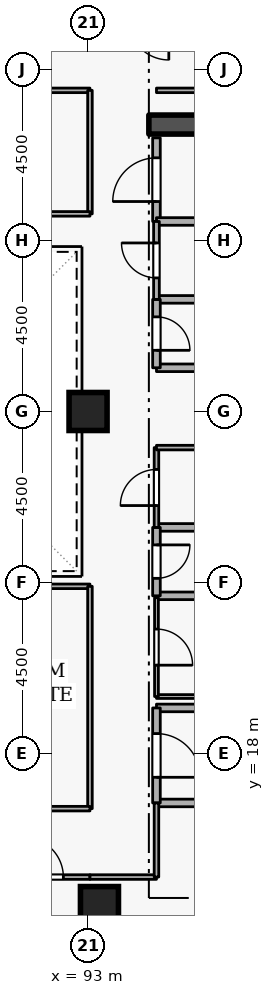
"""IFC4 building model, lengths in metres.
Left out: names, types, materials, properties, quantities, classifications, styles, units other than length and angle.
Written with IfcOpenShell. Run it as: python <this file> out.ifc"""

import sys

from ifc_helpers import new_model, si_unit, direction, frame, frame_2d, origin, origin_2d, place, context, subcontext, project, spatial, rectangle, extrude, element, fill, save


model = new_model("IFC4")
c1 = context("Model", 3, precision=1e-05, world=origin(), true_north=direction((0.0, 1.0)))
c2 = subcontext(c1, "Body", "Model", "MODEL_VIEW")
j1 = project(units=[si_unit("LENGTHUNIT", "METRE"), si_unit("PLANEANGLEUNIT", "RADIAN")], contexts=[c1])
p1 = place(None, origin())
s1 = spatial("IfcSite", under=j1, at=p1, CompositionType="ELEMENT")
p2 = place(p1, origin())
s2 = spatial("IfcBuilding", under=s1, at=p2, CompositionType="ELEMENT")
p3 = place(p2, frame((0.0, 0.0, 203.7)))
s3 = spatial("IfcBuildingStorey", under=s2, at=p3, CompositionType="ELEMENT", Elevation=203.7)
p4 = place(p3, frame((94.6, 34.55, 0.0), z_axis=(0.0, 0.0, 1.0), x_axis=(1.0, 0.0, 0.0)))
e1 = element("IfcWall", 1, at=p4, inside=s3, PredefinedType="SHEAR", context=c2, shape_type="SweptSolid", body=[
    extrude(rectangle(XDim=5.8, YDim=0.5, at=frame_2d((2.9, 0.0))), origin(), (0.0, 0.0, 1.0), 3.6),
])
for number, where, z_axis, x_axis in (
    (2, (93.3, 14.0, 0.0), (0.0, 0.0, 1.0), (1.0, 0.0, 0.0)),
    (3, (93.0, 27.0, 0.0), (0.0, 0.0, 1.0), (1.0, 0.0, 0.0)),
):
    element("IfcColumn", number, at=place(p3, frame(where, z_axis=z_axis, x_axis=x_axis)), inside=s3, PredefinedType="COLUMN", context=c2, shape_type="SweptSolid", body=[
        extrude(rectangle(XDim=1.0, YDim=1.0, at=origin_2d()), origin(), (0.0, 0.0, 1.0), 3.6),
    ])
p5 = place(p3, frame((94.8, 16.7, 0.0), z_axis=(0.0, 0.0, 1.0), x_axis=(1.0, 0.0, 0.0)))
e4 = element("IfcWall", 4, at=p5, inside=s3, PredefinedType="STANDARD", context=c2, shape_type="SweptSolid", body=[
    extrude(rectangle(XDim=5.7, YDim=0.2, at=frame_2d((2.85, 0.0))), origin(), (0.0, 0.0, 1.0), 3.34),
])
p6 = place(p3, frame((97.1, 19.2, 0.0), z_axis=(0.0, 0.0, 1.0), x_axis=(-1.0, 0.0, 0.0)))
e5 = element("IfcWall", 5, at=p6, inside=s3, PredefinedType="STANDARD", context=c2, shape_type="SweptSolid", body=[
    extrude(rectangle(XDim=2.3, YDim=0.2, at=frame_2d((1.15, 0.0))), origin(), (0.0, 0.0, 1.0), 2.545),
])
p7 = place(p3, frame((94.8, 19.2, 0.0), z_axis=(0.0, 0.0, 1.0), x_axis=(0.0, -1.0, 0.0)))
e6 = element("IfcWall", 6, at=p7, inside=s3, PredefinedType="STANDARD", context=c2, shape_type="SweptSolid", body=[
    extrude(rectangle(XDim=2.5, YDim=0.2, at=frame_2d((1.25, 0.0))), origin(), (0.0, 0.0, 1.0), 3.34),
])
p8 = place(p7, frame((0.675, 0.0, 0.0)))
e7 = element("IfcOpeningElement", 7, at=p8, cuts=e6, PredefinedType="OPENING", context=c2, shape_type="SweptSolid", body=[
    extrude(rectangle(XDim=1.15, YDim=2.1, at=frame_2d((0.575, 1.05))), frame((0.0, 0.11, 0.0), z_axis=(0.0, -1.0, 0.0), x_axis=(1.0, 0.0, 0.0)), (0.0, 0.0, 1.0), 0.22),
])
for number, where, z_axis, x_axis in (
    (8, (94.8, 28.15, 0.0), (0.0, 0.0, 1.0), (1.0, 0.0, 0.0)),
    (9, (96.85, 29.95, 0.0), (0.0, 0.0, 1.0), (-1.0, 0.0, 0.0)),
):
    element("IfcWall", number, at=place(p3, frame(where, z_axis=z_axis, x_axis=x_axis)), inside=s3, PredefinedType="STANDARD", context=c2, shape_type="SweptSolid", body=[
        extrude(rectangle(XDim=2.05, YDim=0.2, at=frame_2d((1.025, 0.0))), origin(), (0.0, 0.0, 1.0), 3.34),
    ])
p9 = place(p3, frame((94.8, 29.95, 0.0), z_axis=(0.0, 0.0, 1.0), x_axis=(0.0, -1.0, 0.0)))
e10 = element("IfcWall", 10, at=p9, inside=s3, PredefinedType="STANDARD", context=c2, shape_type="SweptSolid", body=[
    extrude(rectangle(XDim=1.8, YDim=0.2, at=frame_2d((0.9, 0.0))), origin(), (0.0, 0.0, 1.0), 3.34),
])
p10 = place(p9, frame((0.46, 0.0, 0.0)))
e11 = element("IfcOpeningElement", 11, at=p10, cuts=e10, PredefinedType="OPENING", context=c2, shape_type="SweptSolid", body=[
    extrude(rectangle(XDim=0.88, YDim=2.04, at=frame_2d((0.44, 1.02))), frame((0.0, 0.11, 0.0), z_axis=(0.0, -1.0, 0.0), x_axis=(1.0, 0.0, 0.0)), (0.0, 0.0, 1.0), 0.22),
])
for number, where, z_axis, x_axis in (
    (12, (94.8, 22.15, 0.0), (0.0, 0.0, 1.0), (1.0, 0.0, 0.0)),
    (13, (96.85, 23.95, 0.0), (0.0, 0.0, 1.0), (-1.0, 0.0, 0.0)),
):
    element("IfcWall", number, at=place(p3, frame(where, z_axis=z_axis, x_axis=x_axis)), inside=s3, PredefinedType="STANDARD", context=c2, shape_type="SweptSolid", body=[
        extrude(rectangle(XDim=2.05, YDim=0.2, at=frame_2d((1.025, 0.0))), origin(), (0.0, 0.0, 1.0), 3.34),
    ])
p11 = place(p3, frame((94.8, 23.95, 0.0), z_axis=(0.0, 0.0, 1.0), x_axis=(0.0, -1.0, 0.0)))
e14 = element("IfcWall", 14, at=p11, inside=s3, PredefinedType="STANDARD", context=c2, shape_type="SweptSolid", body=[
    extrude(rectangle(XDim=1.8, YDim=0.2, at=frame_2d((0.9, 0.0))), origin(), (0.0, 0.0, 1.0), 3.34),
])
p12 = place(p11, frame((0.46, 0.0, 0.0)))
e15 = element("IfcOpeningElement", 15, at=p12, cuts=e14, PredefinedType="OPENING", context=c2, shape_type="SweptSolid", body=[
    extrude(rectangle(XDim=0.88, YDim=2.04, at=frame_2d((0.44, 1.02))), frame((0.0, 0.11, 0.0), z_axis=(0.0, -1.0, 0.0), x_axis=(1.0, 0.0, 0.0)), (0.0, 0.0, 1.0), 0.22),
])
p13 = place(p3, frame((94.8, 32.0, 0.0), z_axis=(0.0, 0.0, 1.0), x_axis=(0.0, 1.0, 0.0)))
e16 = element("IfcWall", 16, at=p13, inside=s3, PredefinedType="STANDARD", context=c2, shape_type="SweptSolid", body=[
    extrude(rectangle(XDim=2.2, YDim=0.2, at=frame_2d((1.1, 0.0))), origin(), (0.0, 0.0, 1.0), 3.34),
])
p14 = place(p13, frame((0.525, 0.0, 0.0)))
e17 = element("IfcOpeningElement", 17, at=p14, cuts=e16, PredefinedType="OPENING", context=c2, shape_type="SweptSolid", body=[
    extrude(rectangle(XDim=1.15, YDim=2.1, at=frame_2d((0.575, 1.05))), frame((0.0, 0.11, 0.0), z_axis=(0.0, -1.0, 0.0), x_axis=(1.0, 0.0, 0.0)), (0.0, 0.0, 1.0), 0.22),
])
p15 = place(p3, frame((96.85, 32.0, 0.0), z_axis=(0.0, 0.0, 1.0), x_axis=(-1.0, 0.0, 0.0)))
e18 = element("IfcWall", 18, at=p15, inside=s3, PredefinedType="STANDARD", context=c2, shape_type="SweptSolid", body=[
    extrude(rectangle(XDim=2.05, YDim=0.2, at=frame_2d((1.025, 0.0))), origin(), (0.0, 0.0, 1.0), 3.34),
])
p16 = place(p3, frame((94.8, 19.5, 0.0), z_axis=(0.0, 0.0, 1.0), x_axis=(1.0, 0.0, 0.0)))
e19 = element("IfcWall", 19, at=p16, inside=s3, PredefinedType="PARTITIONING", context=c2, shape_type="SweptSolid", body=[
    extrude(rectangle(XDim=2.05, YDim=0.1, at=frame_2d((1.025, 0.0))), origin(), (0.0, 0.0, 1.0), 2.545),
])
p17 = place(p3, frame((94.8, 22.1, 0.0), z_axis=(0.0, 0.0, 1.0), x_axis=(0.0, -1.0, 0.0)))
e20 = element("IfcWall", 20, at=p17, inside=s3, PredefinedType="PARTITIONING", context=c2, shape_type="SweptSolid", body=[
    extrude(rectangle(XDim=2.6, YDim=0.1, at=frame_2d((1.3, 0.0))), origin(), (0.0, 0.0, 1.0), 3.34),
])
p18 = place(p17, frame((0.825, 0.0, 0.0)))
e21 = element("IfcOpeningElement", 21, at=p18, cuts=e20, PredefinedType="OPENING", context=c2, shape_type="SweptSolid", body=[
    extrude(rectangle(XDim=0.95, YDim=2.1, at=frame_2d((0.475, 1.05))), frame((0.0, 0.06, 0.0), z_axis=(0.0, -1.0, 0.0), x_axis=(1.0, 0.0, 0.0)), (0.0, 0.0, 1.0), 0.12),
])
p19 = place(p3, frame((94.8, 23.95, 0.0), z_axis=(0.0, 0.0, 1.0), x_axis=(0.0, 1.0, 0.0)))
e22 = element("IfcWall", 22, at=p19, inside=s3, PredefinedType="PARTITIONING", context=c2, shape_type="SweptSolid", body=[
    extrude(rectangle(XDim=2.1, YDim=0.12, at=frame_2d((1.05, 0.0))), origin(), (0.0, 0.0, 1.0), 3.34),
])
p20 = place(p19, frame((0.575, 0.0, 0.0)))
e23 = element("IfcOpeningElement", 23, at=p20, cuts=e22, PredefinedType="OPENING", context=c2, shape_type="SweptSolid", body=[
    extrude(rectangle(XDim=0.95, YDim=2.1, at=frame_2d((0.475, 1.05))), frame((0.0, 0.07, 0.0), z_axis=(0.0, -1.0, 0.0), x_axis=(1.0, 0.0, 0.0)), (0.0, 0.0, 1.0), 0.14),
])
p21 = place(p3, frame((94.8, 26.05, 0.0), z_axis=(0.0, 0.0, 1.0), x_axis=(1.0, 0.0, 0.0)))
e24 = element("IfcWall", 24, at=p21, inside=s3, PredefinedType="PARTITIONING", context=c2, shape_type="SweptSolid", body=[
    extrude(rectangle(XDim=2.05, YDim=0.12, at=frame_2d((1.025, 0.0))), origin(), (0.0, 0.0, 1.0), 3.34),
])
p22 = place(p3, frame((94.8, 29.95, 0.0), z_axis=(0.0, 0.0, 1.0), x_axis=(0.0, 1.0, 0.0)))
e25 = element("IfcWall", 25, at=p22, inside=s3, PredefinedType="PARTITIONING", context=c2, shape_type="SweptSolid", body=[
    extrude(rectangle(XDim=2.05, YDim=0.15, at=frame_2d((1.025, 0.0))), origin(), (0.0, 0.0, 1.0), 3.34),
])
p23 = place(p22, frame((0.565, 0.0, 0.0)))
e26 = element("IfcOpeningElement", 26, at=p23, cuts=e25, PredefinedType="OPENING", context=c2, shape_type="SweptSolid", body=[
    extrude(rectangle(XDim=0.92, YDim=2.08, at=frame_2d((0.46, 1.04))), frame((0.0, 0.085, 0.0), z_axis=(0.0, -1.0, 0.0), x_axis=(1.0, 0.0, 0.0)), (0.0, 0.0, 1.0), 0.17),
])
p24 = place(p3, frame((94.8, 35.45, 0.0), z_axis=(0.0, 0.0, 1.0), x_axis=(1.0, 0.0, 0.0)))
e27 = element("IfcWall", 27, at=p24, inside=s3, PredefinedType="PARTITIONING", context=c2, shape_type="SweptSolid", body=[
    extrude(rectangle(XDim=5.9, YDim=0.12, at=frame_2d((2.95, 0.0))), origin(), (0.0, 0.0, 1.0), 3.34),
])
p25 = place(p3, frame((90.6, 14.75, 0.0), z_axis=(0.0, 0.0, 1.0), x_axis=(1.0, 0.0, 0.0)))
e28 = element("IfcWall", 28, at=p25, inside=s3, PredefinedType="PARTITIONING", context=c2, shape_type="SweptSolid", body=[
    extrude(rectangle(XDim=2.45, YDim=0.12, at=frame_2d((1.225, 0.0))), origin(), (0.0, 0.0, 1.0), 3.34),
])
p26 = place(p25, frame((0.7, 0.0, 0.0)))
e29 = element("IfcOpeningElement", 29, at=p26, cuts=e28, PredefinedType="OPENING", context=c2, shape_type="SweptSolid", body=[
    extrude(rectangle(XDim=1.05, YDim=2.1, at=frame_2d((0.525, 1.05))), frame((0.0, 0.07, 0.0), z_axis=(0.0, -1.0, 0.0), x_axis=(1.0, 0.0, 0.0)), (0.0, 0.0, 1.0), 0.14),
])
p27 = place(p3, frame((93.05, 14.75, 0.0), z_axis=(0.0, 0.0, 1.0), x_axis=(1.0, 0.0, 0.0)))
e30 = element("IfcWall", 30, at=p27, inside=s3, PredefinedType="PARTITIONING", context=c2, shape_type="SweptSolid", body=[
    extrude(rectangle(XDim=1.75, YDim=0.12, at=frame_2d((0.875, 0.0))), origin(), (0.0, 0.0, 1.0), 3.34),
])
p28 = place(p3, frame((94.8, 14.75, 0.0), z_axis=(0.0, 0.0, 1.0), x_axis=(0.0, 1.0, 0.0)))
e31 = element("IfcWall", 31, at=p28, inside=s3, PredefinedType="PARTITIONING", context=c2, shape_type="SweptSolid", body=[
    extrude(rectangle(XDim=1.95, YDim=0.12, at=frame_2d((0.975, 0.0))), origin(), (0.0, 0.0, 1.0), 3.34),
])
p29 = place(p3, frame((83.95, 22.4, 0.0), z_axis=(0.0, 0.0, 1.0), x_axis=(1.0, 0.0, 0.0)))
e32 = element("IfcWall", 32, at=p29, inside=s3, PredefinedType="PARTITIONING", context=c2, shape_type="SweptSolid", body=[
    extrude(rectangle(XDim=9.1, YDim=0.12, at=frame_2d((4.55, 0.0))), origin(), (0.0, 0.0, 1.0), 3.34),
])
p30 = place(p3, frame((93.05, 22.4, 0.0), z_axis=(0.0, 0.0, 1.0), x_axis=(0.0, -1.0, 0.0)))
e33 = element("IfcWall", 33, at=p30, inside=s3, PredefinedType="PARTITIONING", context=c2, shape_type="SweptSolid", body=[
    extrude(rectangle(XDim=5.85, YDim=0.12, at=frame_2d((2.925, 0.0))), origin(), (0.0, 0.0, 1.0), 3.34),
])
p31 = place(p3, frame((93.05, 16.55, 0.0), z_axis=(0.0, 0.0, 1.0), x_axis=(-1.0, 0.0, 0.0)))
e34 = element("IfcWall", 34, at=p31, inside=s3, PredefinedType="PARTITIONING", context=c2, shape_type="SweptSolid", body=[
    extrude(rectangle(XDim=9.1, YDim=0.12, at=frame_2d((4.55, 0.0))), origin(), (0.0, 0.0, 1.0), 3.34),
])
p32 = place(p31, frame((4.075, 0.0, 0.0)))
e35 = element("IfcOpeningElement", 35, at=p32, cuts=e34, PredefinedType="OPENING", context=c2, shape_type="SweptSolid", body=[
    extrude(rectangle(XDim=0.95, YDim=2.1, at=frame_2d((0.475, 1.05))), frame((0.0, 0.07, 0.0), z_axis=(0.0, -1.0, 0.0), x_axis=(1.0, 0.0, 0.0)), (0.0, 0.0, 1.0), 0.14),
])
p33 = place(p3, frame((83.95, 35.45, 0.0), z_axis=(0.0, 0.0, 1.0), x_axis=(1.0, 0.0, 0.0)))
e36 = element("IfcWall", 36, at=p33, inside=s3, PredefinedType="PARTITIONING", context=c2, shape_type="SweptSolid", body=[
    extrude(rectangle(XDim=9.1, YDim=0.12, at=frame_2d((4.55, 0.0))), origin(), (0.0, 0.0, 1.0), 3.34),
])
p34 = place(p33, frame((4.075, 0.0, 0.0)))
e37 = element("IfcOpeningElement", 37, at=p34, cuts=e36, PredefinedType="OPENING", context=c2, shape_type="SweptSolid", body=[
    extrude(rectangle(XDim=0.95, YDim=2.1, at=frame_2d((0.475, 1.05))), frame((0.0, 0.07, 0.0), z_axis=(0.0, -1.0, 0.0), x_axis=(1.0, 0.0, 0.0)), (0.0, 0.0, 1.0), 0.14),
])
p35 = place(p3, frame((93.05, 35.45, 0.0), z_axis=(0.0, 0.0, 1.0), x_axis=(0.0, -1.0, 0.0)))
e38 = element("IfcWall", 38, at=p35, inside=s3, PredefinedType="PARTITIONING", context=c2, shape_type="SweptSolid", body=[
    extrude(rectangle(XDim=3.25, YDim=0.12, at=frame_2d((1.625, 0.0))), origin(), (0.0, 0.0, 1.0), 3.34),
])
p36 = place(p3, frame((93.05, 32.2, 0.0), z_axis=(0.0, 0.0, 1.0), x_axis=(-1.0, 0.0, 0.0)))
e39 = element("IfcWall", 39, at=p36, inside=s3, PredefinedType="PARTITIONING", context=c2, shape_type="SweptSolid", body=[
    extrude(rectangle(XDim=9.1, YDim=0.12, at=frame_2d((4.55, 0.0))), origin(), (0.0, 0.0, 1.0), 3.34),
])
p37 = place(p8, origin())
e40 = element("IfcDoor", 40, at=p37, inside=s3, OperationType="SINGLE_SWING_RIGHT", PredefinedType="DOOR", context=c2, shape_type="SweptSolid", body=[
    extrude(rectangle(XDim=1.15, YDim=2.1, at=frame_2d((0.575, 1.05))), frame((0.0, 0.025, 0.0), z_axis=(0.0, -1.0, 0.0), x_axis=(1.0, 0.0, 0.0)), (0.0, 0.0, 1.0), 0.05),
])
fill(e7, e40)
p38 = place(p10, origin())
e41 = element("IfcDoor", 41, at=p38, inside=s3, OperationType="SINGLE_SWING_RIGHT", PredefinedType="DOOR", context=c2, shape_type="SweptSolid", body=[
    extrude(rectangle(XDim=0.88, YDim=2.04, at=frame_2d((0.44, 1.02))), frame((0.0, 0.025, 0.0), z_axis=(0.0, -1.0, 0.0), x_axis=(1.0, 0.0, 0.0)), (0.0, 0.0, 1.0), 0.05),
])
fill(e11, e41)
p39 = place(p12, origin())
e42 = element("IfcDoor", 42, at=p39, inside=s3, OperationType="SINGLE_SWING_LEFT", PredefinedType="DOOR", context=c2, shape_type="SweptSolid", body=[
    extrude(rectangle(XDim=0.88, YDim=2.04, at=frame_2d((0.44, 1.02))), frame((0.0, 0.025, 0.0), z_axis=(0.0, -1.0, 0.0), x_axis=(1.0, 0.0, 0.0)), (0.0, 0.0, 1.0), 0.05),
])
fill(e15, e42)
p40 = place(p18, origin())
e43 = element("IfcDoor", 43, at=p40, inside=s3, OperationType="SINGLE_SWING_RIGHT", PredefinedType="DOOR", context=c2, shape_type="SweptSolid", body=[
    extrude(rectangle(XDim=0.95, YDim=2.1, at=frame_2d((0.475, 1.05))), frame((0.0, 0.025, 0.0), z_axis=(0.0, -1.0, 0.0), x_axis=(1.0, 0.0, 0.0)), (0.0, 0.0, 1.0), 0.05),
])
fill(e21, e43)
p41 = place(p20, origin())
e44 = element("IfcDoor", 44, at=p41, inside=s3, OperationType="SINGLE_SWING_LEFT", PredefinedType="DOOR", context=c2, shape_type="SweptSolid", body=[
    extrude(rectangle(XDim=0.95, YDim=2.1, at=frame_2d((0.475, 1.05))), frame((0.0, 0.025, 0.0), z_axis=(0.0, -1.0, 0.0), x_axis=(1.0, 0.0, 0.0)), (0.0, 0.0, 1.0), 0.05),
])
fill(e23, e44)
p42 = place(p23, origin())
e45 = element("IfcDoor", 45, at=p42, inside=s3, OperationType="SINGLE_SWING_RIGHT", PredefinedType="DOOR", context=c2, shape_type="SweptSolid", body=[
    extrude(rectangle(XDim=0.92, YDim=2.08, at=frame_2d((0.46, 1.04))), frame((0.0, 0.025, 0.0), z_axis=(0.0, -1.0, 0.0), x_axis=(1.0, 0.0, 0.0)), (0.0, 0.0, 1.0), 0.05),
])
fill(e26, e45)
p43 = place(p14, origin())
e46 = element("IfcDoor", 46, at=p43, inside=s3, OperationType="SINGLE_SWING_LEFT", PredefinedType="DOOR", context=c2, shape_type="SweptSolid", body=[
    extrude(rectangle(XDim=1.15, YDim=2.1, at=frame_2d((0.575, 1.05))), frame((0.0, 0.025, 0.0), z_axis=(0.0, -1.0, 0.0), x_axis=(1.0, 0.0, 0.0)), (0.0, 0.0, 1.0), 0.05),
])
fill(e17, e46)
p44 = place(p26, origin())
e47 = element("IfcDoor", 47, at=p44, inside=s3, OperationType="SINGLE_SWING_LEFT", PredefinedType="DOOR", context=c2, shape_type="SweptSolid", body=[
    extrude(rectangle(XDim=1.05, YDim=2.1, at=frame_2d((0.525, 1.05))), frame((0.0, 0.025, 0.0), z_axis=(0.0, -1.0, 0.0), x_axis=(1.0, 0.0, 0.0)), (0.0, 0.0, 1.0), 0.05),
])
fill(e29, e47)
save(model, sys.argv[1])
